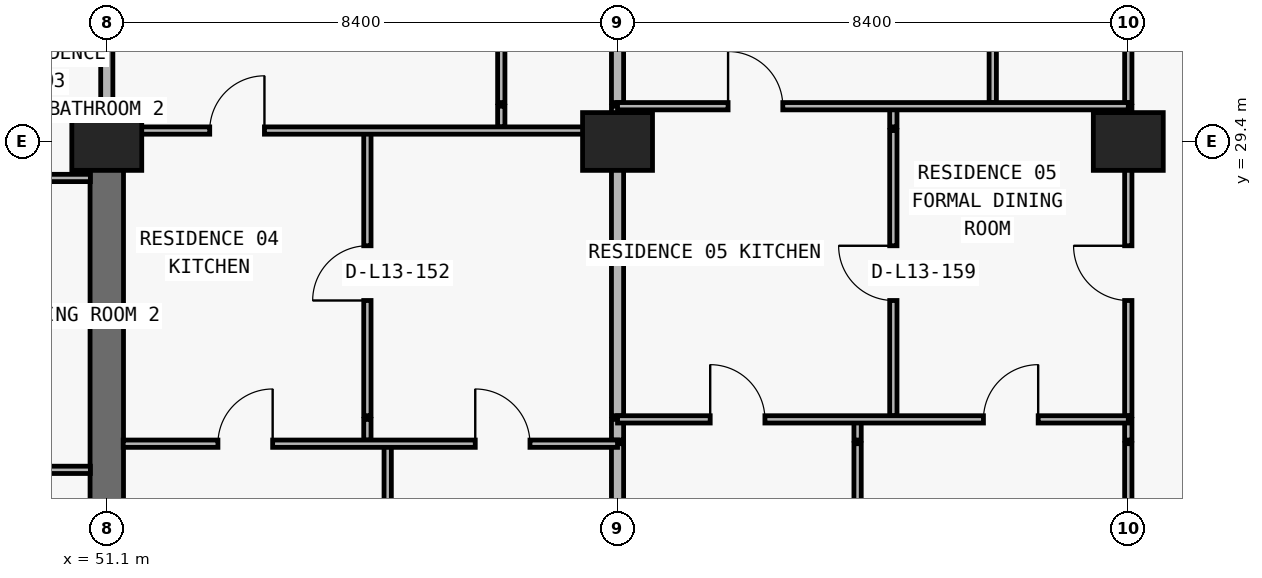
"""IFC4 building model, lengths in metres.
Left out: names, types, materials, properties, quantities, classifications, styles, units other than length and angle.
Written with IfcOpenShell. Run it as: python <this file> out.ifc"""

import sys

from ifc_helpers import new_model, si_unit, direction, frame, frame_2d, origin, origin_2d, place, context, subcontext, project, spatial, rectangle, extrude, element, fill, save


model = new_model("IFC4")
c1 = context("Model", 3, precision=1e-05, world=origin(), true_north=direction((0.0, 1.0)))
c2 = subcontext(c1, "Body", "Model", "MODEL_VIEW")
j1 = project(units=[si_unit("LENGTHUNIT", "METRE"), si_unit("PLANEANGLEUNIT", "RADIAN")], contexts=[c1])
p1 = place(None, origin())
s1 = spatial("IfcSite", under=j1, at=p1, CompositionType="ELEMENT")
p2 = place(p1, origin())
s2 = spatial("IfcBuilding", under=s1, at=p2, CompositionType="ELEMENT")
p3 = place(p2, frame((0.0, 0.0, 53.1)))
s3 = spatial("IfcBuildingStorey", under=s2, at=p3, CompositionType="ELEMENT", Elevation=53.1)
for number, where, z_axis, x_axis in (
    (1, (51.1, 29.4, 0.0), (0.0, 0.0, 1.0), (1.0, 0.0, 0.0)),
    (2, (59.5, 29.4, 0.0), (0.0, 0.0, 1.0), (1.0, 0.0, 0.0)),
    (3, (67.9, 29.4, 0.0), (0.0, 0.0, 1.0), (1.0, 0.0, 0.0)),
):
    element("IfcColumn", number, at=place(p3, frame(where, z_axis=z_axis, x_axis=x_axis)), inside=s3, PredefinedType="COLUMN", context=c2, shape_type="SweptSolid", body=[
        extrude(rectangle(XDim=1.15, YDim=0.95, at=origin_2d()), origin(), (0.0, 0.0, 1.0), 3.05),
    ])
p4 = place(p3, frame((51.1, 20.8, 0.0), z_axis=(0.0, 0.0, 1.0), x_axis=(0.0, 1.0, 0.0)))
e4 = element("IfcWall", 4, at=p4, inside=s3, PredefinedType="SHEAR", context=c2, shape_type="SweptSolid", body=[
    extrude(rectangle(XDim=8.6, YDim=0.55, at=frame_2d((4.3, 0.0))), origin(), (0.0, 0.0, 1.0), 3.05),
])
p5 = place(p3, frame((51.1, 29.64, 0.0), z_axis=(0.0, 0.0, 1.0), x_axis=(0.0, 1.0, 0.0)))
e5 = element("IfcWall", 5, at=p5, inside=s3, PredefinedType="PARTITIONING", context=c2, shape_type="SweptSolid", body=[
    extrude(rectangle(XDim=0.34, YDim=0.2, at=frame_2d((0.17, 0.0))), origin(), (0.0, 0.0, 1.0), 2.335),
])
p6 = place(p3, frame((51.1, 30.04, 0.0), z_axis=(0.0, 0.0, 1.0), x_axis=(0.0, 1.0, 0.0)))
e6 = element("IfcWall", 6, at=p6, inside=s3, PredefinedType="PARTITIONING", context=c2, shape_type="SweptSolid", body=[
    extrude(rectangle(XDim=4.56, YDim=0.2, at=frame_2d((2.28, 0.0))), origin(), (0.0, 0.0, 1.0), 2.335),
])
p7 = place(p3, frame((55.386, 24.49, 0.0), z_axis=(0.0, 0.0, 1.0), x_axis=(0.0, 1.0, 0.0)))
e7 = element("IfcWall", 7, at=p7, inside=s3, PredefinedType="PARTITIONING", context=c2, shape_type="SweptSolid", body=[
    extrude(rectangle(XDim=0.34, YDim=0.12, at=frame_2d((0.17, 0.0))), origin(), (0.0, 0.0, 1.0), 2.423),
])
p8 = place(p3, frame((55.386, 24.89, 0.0), z_axis=(0.0, 0.0, 1.0), x_axis=(0.0, 1.0, 0.0)))
e8 = element("IfcWall", 8, at=p8, inside=s3, PredefinedType="PARTITIONING", context=c2, shape_type="SweptSolid", body=[
    extrude(rectangle(XDim=4.69, YDim=0.12, at=frame_2d((2.345, 0.0))), origin(), (0.0, 0.0, 1.0), 2.423),
])
p9 = place(p8, frame((1.895, 0.0, 0.0)))
e9 = element("IfcOpeningElement", 9, at=p9, cuts=e8, PredefinedType="OPENING", context=c2, shape_type="SweptSolid", body=[
    extrude(rectangle(XDim=0.9, YDim=2.15, at=frame_2d((0.45, 1.075))), frame((0.0, 0.07, 0.0), z_axis=(0.0, -1.0, 0.0), x_axis=(1.0, 0.0, 0.0)), (0.0, 0.0, 1.0), 0.14),
])
p10 = place(p3, frame((55.72, 6.24, 0.0), z_axis=(0.0, 0.0, 1.0), x_axis=(0.0, 1.0, 0.0)))
e10 = element("IfcWall", 10, at=p10, inside=s3, PredefinedType="PARTITIONING", context=c2, shape_type="SweptSolid", body=[
    extrude(rectangle(XDim=18.19, YDim=0.12, at=frame_2d((9.095, 0.0))), origin(), (0.0, 0.0, 1.0), 3.05),
])
p11 = place(p3, frame((57.588, 29.64, 0.0), z_axis=(0.0, 0.0, 1.0), x_axis=(0.0, 1.0, 0.0)))
e11 = element("IfcWall", 11, at=p11, inside=s3, PredefinedType="PARTITIONING", context=c2, shape_type="SweptSolid", body=[
    extrude(rectangle(XDim=0.34, YDim=0.12, at=frame_2d((0.17, 0.0))), origin(), (0.0, 0.0, 1.0), 3.05),
])
p12 = place(p3, frame((57.588, 30.04, 0.0), z_axis=(0.0, 0.0, 1.0), x_axis=(0.0, 1.0, 0.0)))
e12 = element("IfcWall", 12, at=p12, inside=s3, PredefinedType="PARTITIONING", context=c2, shape_type="SweptSolid", body=[
    extrude(rectangle(XDim=4.56, YDim=0.12, at=frame_2d((2.28, 0.0))), origin(), (0.0, 0.0, 1.0), 3.05),
])
p13 = place(p12, frame((1.855, 0.0, 0.0)))
e13 = element("IfcOpeningElement", 13, at=p13, cuts=e12, PredefinedType="OPENING", context=c2, shape_type="SweptSolid", body=[
    extrude(rectangle(XDim=0.85, YDim=2.1, at=frame_2d((0.425, 1.05))), frame((0.0, 0.07, 0.0), z_axis=(0.0, -1.0, 0.0), x_axis=(1.0, 0.0, 0.0)), (0.0, 0.0, 1.0), 0.14),
])
p14 = place(p3, frame((59.5, 6.24, 0.0), z_axis=(0.0, 0.0, 1.0), x_axis=(0.0, 1.0, 0.0)))
e14 = element("IfcWall", 14, at=p14, inside=s3, PredefinedType="PARTITIONING", context=c2, shape_type="SweptSolid", body=[
    extrude(rectangle(XDim=18.19, YDim=0.2, at=frame_2d((9.095, 0.0))), origin(), (0.0, 0.0, 1.0), 2.11),
])
p15 = place(p3, frame((59.5, 24.49, 0.0), z_axis=(0.0, 0.0, 1.0), x_axis=(0.0, 1.0, 0.0)))
e15 = element("IfcWall", 15, at=p15, inside=s3, PredefinedType="PARTITIONING", context=c2, shape_type="SweptSolid", body=[
    extrude(rectangle(XDim=0.34, YDim=0.2, at=frame_2d((0.17, 0.0))), origin(), (0.0, 0.0, 1.0), 2.11),
])
p16 = place(p3, frame((59.5, 24.89, 0.0), z_axis=(0.0, 0.0, 1.0), x_axis=(0.0, 1.0, 0.0)))
e16 = element("IfcWall", 16, at=p16, inside=s3, PredefinedType="PARTITIONING", context=c2, shape_type="SweptSolid", body=[
    extrude(rectangle(XDim=4.69, YDim=0.2, at=frame_2d((2.345, 0.0))), origin(), (0.0, 0.0, 1.0), 2.11),
])
p17 = place(p3, frame((59.5, 29.64, 0.0), z_axis=(0.0, 0.0, 1.0), x_axis=(0.0, 1.0, 0.0)))
e17 = element("IfcWall", 17, at=p17, inside=s3, PredefinedType="PARTITIONING", context=c2, shape_type="SweptSolid", body=[
    extrude(rectangle(XDim=0.34, YDim=0.2, at=frame_2d((0.17, 0.0))), origin(), (0.0, 0.0, 1.0), 2.11),
])
p18 = place(p3, frame((59.5, 30.04, 0.0), z_axis=(0.0, 0.0, 1.0), x_axis=(0.0, 1.0, 0.0)))
e18 = element("IfcWall", 18, at=p18, inside=s3, PredefinedType="PARTITIONING", context=c2, shape_type="SweptSolid", body=[
    extrude(rectangle(XDim=4.56, YDim=0.2, at=frame_2d((2.28, 0.0))), origin(), (0.0, 0.0, 1.0), 2.11),
])
p19 = place(p3, frame((63.448, 6.24, 0.0), z_axis=(0.0, 0.0, 1.0), x_axis=(0.0, 1.0, 0.0)))
e19 = element("IfcWall", 19, at=p19, inside=s3, PredefinedType="PARTITIONING", context=c2, shape_type="SweptSolid", body=[
    extrude(rectangle(XDim=18.19, YDim=0.12, at=frame_2d((9.095, 0.0))), origin(), (0.0, 0.0, 1.0), 2.423),
])
p20 = place(p3, frame((63.448, 24.49, 0.0), z_axis=(0.0, 0.0, 1.0), x_axis=(0.0, 1.0, 0.0)))
e20 = element("IfcWall", 20, at=p20, inside=s3, PredefinedType="PARTITIONING", context=c2, shape_type="SweptSolid", body=[
    extrude(rectangle(XDim=0.34, YDim=0.12, at=frame_2d((0.17, 0.0))), origin(), (0.0, 0.0, 1.0), 2.423),
])
p21 = place(p3, frame((64.036, 24.89, 0.0), z_axis=(0.0, 0.0, 1.0), x_axis=(0.0, 1.0, 0.0)))
e21 = element("IfcWall", 21, at=p21, inside=s3, PredefinedType="PARTITIONING", context=c2, shape_type="SweptSolid", body=[
    extrude(rectangle(XDim=4.69, YDim=0.12, at=frame_2d((2.345, 0.0))), origin(), (0.0, 0.0, 1.0), 3.05),
])
p22 = place(p21, frame((1.895, 0.0, 0.0)))
e22 = element("IfcOpeningElement", 22, at=p22, cuts=e21, PredefinedType="OPENING", context=c2, shape_type="SweptSolid", body=[
    extrude(rectangle(XDim=0.9, YDim=2.15, at=frame_2d((0.45, 1.075))), frame((0.0, 0.07, 0.0), z_axis=(0.0, -1.0, 0.0), x_axis=(1.0, 0.0, 0.0)), (0.0, 0.0, 1.0), 0.14),
])
p23 = place(p3, frame((64.036, 29.64, 0.0), z_axis=(0.0, 0.0, 1.0), x_axis=(0.0, 1.0, 0.0)))
e23 = element("IfcWall", 23, at=p23, inside=s3, PredefinedType="PARTITIONING", context=c2, shape_type="SweptSolid", body=[
    extrude(rectangle(XDim=0.34, YDim=0.12, at=frame_2d((0.17, 0.0))), origin(), (0.0, 0.0, 1.0), 3.05),
])
p24 = place(p3, frame((65.671, 30.04, 0.0), z_axis=(0.0, 0.0, 1.0), x_axis=(0.0, 1.0, 0.0)))
e24 = element("IfcWall", 24, at=p24, inside=s3, PredefinedType="PARTITIONING", context=c2, shape_type="SweptSolid", body=[
    extrude(rectangle(XDim=4.56, YDim=0.12, at=frame_2d((2.28, 0.0))), origin(), (0.0, 0.0, 1.0), 2.578),
])
p25 = place(p24, frame((1.855, 0.0, 0.0)))
e25 = element("IfcOpeningElement", 25, at=p25, cuts=e24, PredefinedType="OPENING", context=c2, shape_type="SweptSolid", body=[
    extrude(rectangle(XDim=0.85, YDim=2.1, at=frame_2d((0.425, 1.05))), frame((0.0, 0.07, 0.0), z_axis=(0.0, -1.0, 0.0), x_axis=(1.0, 0.0, 0.0)), (0.0, 0.0, 1.0), 0.14),
])
p26 = place(p3, frame((67.9, 6.24, 0.0), z_axis=(0.0, 0.0, 1.0), x_axis=(0.0, 1.0, 0.0)))
e26 = element("IfcWall", 26, at=p26, inside=s3, PredefinedType="PARTITIONING", context=c2, shape_type="SweptSolid", body=[
    extrude(rectangle(XDim=18.19, YDim=0.12, at=frame_2d((9.095, 0.0))), origin(), (0.0, 0.0, 1.0), 2.11),
])
p27 = place(p3, frame((67.9, 24.49, 0.0), z_axis=(0.0, 0.0, 1.0), x_axis=(0.0, 1.0, 0.0)))
e27 = element("IfcWall", 27, at=p27, inside=s3, PredefinedType="PARTITIONING", context=c2, shape_type="SweptSolid", body=[
    extrude(rectangle(XDim=0.34, YDim=0.12, at=frame_2d((0.17, 0.0))), origin(), (0.0, 0.0, 1.0), 2.11),
])
p28 = place(p3, frame((67.9, 24.89, 0.0), z_axis=(0.0, 0.0, 1.0), x_axis=(0.0, 1.0, 0.0)))
e28 = element("IfcWall", 28, at=p28, inside=s3, PredefinedType="PARTITIONING", context=c2, shape_type="SweptSolid", body=[
    extrude(rectangle(XDim=4.69, YDim=0.12, at=frame_2d((2.345, 0.0))), origin(), (0.0, 0.0, 1.0), 2.11),
])
p29 = place(p28, frame((1.895, 0.0, 0.0)))
e29 = element("IfcOpeningElement", 29, at=p29, cuts=e28, PredefinedType="OPENING", context=c2, shape_type="SweptSolid", body=[
    extrude(rectangle(XDim=0.9, YDim=2.06, at=frame_2d((0.45, 1.03))), frame((0.0, 0.07, 0.0), z_axis=(0.0, -1.0, 0.0), x_axis=(1.0, 0.0, 0.0)), (0.0, 0.0, 1.0), 0.14),
])
p30 = place(p3, frame((67.9, 29.64, 0.0), z_axis=(0.0, 0.0, 1.0), x_axis=(0.0, 1.0, 0.0)))
e30 = element("IfcWall", 30, at=p30, inside=s3, PredefinedType="PARTITIONING", context=c2, shape_type="SweptSolid", body=[
    extrude(rectangle(XDim=0.34, YDim=0.12, at=frame_2d((0.17, 0.0))), origin(), (0.0, 0.0, 1.0), 2.11),
])
p31 = place(p3, frame((67.9, 30.04, 0.0), z_axis=(0.0, 0.0, 1.0), x_axis=(0.0, 1.0, 0.0)))
e31 = element("IfcWall", 31, at=p31, inside=s3, PredefinedType="PARTITIONING", context=c2, shape_type="SweptSolid", body=[
    extrude(rectangle(XDim=4.56, YDim=0.12, at=frame_2d((2.28, 0.0))), origin(), (0.0, 0.0, 1.0), 2.11),
])
p32 = place(p3, frame((42.7, 24.0, 0.0), z_axis=(0.0, 0.0, 1.0), x_axis=(1.0, 0.0, 0.0)))
e32 = element("IfcWall", 32, at=p32, inside=s3, PredefinedType="PARTITIONING", context=c2, shape_type="SweptSolid", body=[
    extrude(rectangle(XDim=8.13, YDim=0.12, at=frame_2d((4.065, 0.0))), origin(), (0.0, 0.0, 1.0), 3.05),
])
p33 = place(p32, frame((3.615, 0.0, 0.0)))
e33 = element("IfcOpeningElement", 33, at=p33, cuts=e32, PredefinedType="OPENING", context=c2, shape_type="SweptSolid", body=[
    extrude(rectangle(XDim=0.9, YDim=2.15, at=frame_2d((0.45, 1.075))), frame((0.0, 0.07, 0.0), z_axis=(0.0, -1.0, 0.0), x_axis=(1.0, 0.0, 0.0)), (0.0, 0.0, 1.0), 0.14),
])
p34 = place(p3, frame((51.37, 24.43, 0.0), z_axis=(0.0, 0.0, 1.0), x_axis=(1.0, 0.0, 0.0)))
e34 = element("IfcWall", 34, at=p34, inside=s3, PredefinedType="PARTITIONING", context=c2, shape_type="SweptSolid", body=[
    extrude(rectangle(XDim=8.13, YDim=0.12, at=frame_2d((4.065, 0.0))), origin(), (0.0, 0.0, 1.0), 3.05),
])
p35 = place(p34, frame((1.558, 0.0, 0.0)))
e35 = element("IfcOpeningElement", 35, at=p35, cuts=e34, PredefinedType="OPENING", context=c2, shape_type="SweptSolid", body=[
    extrude(rectangle(XDim=0.9, YDim=2.15, at=frame_2d((0.45, 1.075))), frame((0.0, 0.07, 0.0), z_axis=(0.0, -1.0, 0.0), x_axis=(1.0, 0.0, 0.0)), (0.0, 0.0, 1.0), 0.14),
])
p36 = place(p34, frame((5.79, 0.0, 0.0)))
e36 = element("IfcOpeningElement", 36, at=p36, cuts=e34, PredefinedType="OPENING", context=c2, shape_type="SweptSolid", body=[
    extrude(rectangle(XDim=0.9, YDim=2.15, at=frame_2d((0.45, 1.075))), frame((0.0, 0.07, 0.0), z_axis=(0.0, -1.0, 0.0), x_axis=(1.0, 0.0, 0.0)), (0.0, 0.0, 1.0), 0.14),
])
p37 = place(p3, frame((59.5, 24.83, 0.0), z_axis=(0.0, 0.0, 1.0), x_axis=(1.0, 0.0, 0.0)))
e37 = element("IfcWall", 37, at=p37, inside=s3, PredefinedType="PARTITIONING", context=c2, shape_type="SweptSolid", body=[
    extrude(rectangle(XDim=8.4, YDim=0.12, at=frame_2d((4.2, 0.0))), origin(), (0.0, 0.0, 1.0), 3.05),
])
p38 = place(p37, frame((1.524, 0.0, 0.0)))
e38 = element("IfcOpeningElement", 38, at=p38, cuts=e37, PredefinedType="OPENING", context=c2, shape_type="SweptSolid", body=[
    extrude(rectangle(XDim=0.9, YDim=2.15, at=frame_2d((0.45, 1.075))), frame((0.0, 0.07, 0.0), z_axis=(0.0, -1.0, 0.0), x_axis=(1.0, 0.0, 0.0)), (0.0, 0.0, 1.0), 0.14),
])
p39 = place(p37, frame((6.018, 0.0, 0.0)))
e39 = element("IfcOpeningElement", 39, at=p39, cuts=e37, PredefinedType="OPENING", context=c2, shape_type="SweptSolid", body=[
    extrude(rectangle(XDim=0.9, YDim=2.15, at=frame_2d((0.45, 1.075))), frame((0.0, 0.07, 0.0), z_axis=(0.0, -1.0, 0.0), x_axis=(1.0, 0.0, 0.0)), (0.0, 0.0, 1.0), 0.14),
])
p40 = place(p3, frame((42.705, 28.8, 0.0), z_axis=(0.0, 0.0, 1.0), x_axis=(1.0, 0.0, 0.0)))
e40 = element("IfcWall", 40, at=p40, inside=s3, PredefinedType="PARTITIONING", context=c2, shape_type="SweptSolid", body=[
    extrude(rectangle(XDim=8.125, YDim=0.12, at=frame_2d((4.062, 0.0))), origin(), (0.0, 0.0, 1.0), 3.05),
])
p41 = place(p40, frame((2.877, 0.0, 0.0)))
e41 = element("IfcOpeningElement", 41, at=p41, cuts=e40, PredefinedType="OPENING", context=c2, shape_type="SweptSolid", body=[
    extrude(rectangle(XDim=0.9, YDim=2.15, at=frame_2d((0.45, 1.075))), frame((0.0, 0.07, 0.0), z_axis=(0.0, -1.0, 0.0), x_axis=(1.0, 0.0, 0.0)), (0.0, 0.0, 1.0), 0.14),
])
p42 = place(p3, frame((51.1, 29.58, 0.0), z_axis=(0.0, 0.0, 1.0), x_axis=(1.0, 0.0, 0.0)))
e42 = element("IfcWall", 42, at=p42, inside=s3, PredefinedType="PARTITIONING", context=c2, shape_type="SweptSolid", body=[
    extrude(rectangle(XDim=8.4, YDim=0.12, at=frame_2d((4.2, 0.0))), origin(), (0.0, 0.0, 1.0), 2.11),
])
p43 = place(p42, frame((1.693, 0.0, 0.0)))
e43 = element("IfcOpeningElement", 43, at=p43, cuts=e42, PredefinedType="OPENING", context=c2, shape_type="SweptSolid", body=[
    extrude(rectangle(XDim=0.9, YDim=2.06, at=frame_2d((0.45, 1.03))), frame((0.0, 0.07, 0.0), z_axis=(0.0, -1.0, 0.0), x_axis=(1.0, 0.0, 0.0)), (0.0, 0.0, 1.0), 0.14),
])
p44 = place(p3, frame((59.5, 29.98, 0.0), z_axis=(0.0, 0.0, 1.0), x_axis=(1.0, 0.0, 0.0)))
e44 = element("IfcWall", 44, at=p44, inside=s3, PredefinedType="PARTITIONING", context=c2, shape_type="SweptSolid", body=[
    extrude(rectangle(XDim=8.4, YDim=0.12, at=frame_2d((4.2, 0.0))), origin(), (0.0, 0.0, 1.0), 3.05),
])
p45 = place(p44, frame((1.818, 0.0, 0.0)))
e45 = element("IfcOpeningElement", 45, at=p45, cuts=e44, PredefinedType="OPENING", context=c2, shape_type="SweptSolid", body=[
    extrude(rectangle(XDim=0.9, YDim=2.15, at=frame_2d((0.45, 1.075))), frame((0.0, 0.07, 0.0), z_axis=(0.0, -1.0, 0.0), x_axis=(1.0, 0.0, 0.0)), (0.0, 0.0, 1.0), 0.14),
])
p46 = place(p43, origin())
e46 = element("IfcDoor", 46, at=p46, inside=s3, OperationType="SINGLE_SWING_RIGHT", PredefinedType="DOOR", context=c2, shape_type="SweptSolid", body=[
    extrude(rectangle(XDim=0.9, YDim=2.06, at=frame_2d((0.45, 1.03))), frame((0.0, 0.025, 0.0), z_axis=(0.0, -1.0, 0.0), x_axis=(1.0, 0.0, 0.0)), (0.0, 0.0, 1.0), 0.05),
])
fill(e43, e46)
p47 = place(p9, origin())
e47 = element("IfcDoor", 47, at=p47, inside=s3, OperationType="SINGLE_SWING_LEFT", PredefinedType="DOOR", context=c2, shape_type="SweptSolid", body=[
    extrude(rectangle(XDim=0.9, YDim=2.15, at=frame_2d((0.45, 1.075))), frame((0.0, 0.025, 0.0), z_axis=(0.0, -1.0, 0.0), x_axis=(1.0, 0.0, 0.0)), (0.0, 0.0, 1.0), 0.05),
])
fill(e9, e47)
p48 = place(p35, origin())
e48 = element("IfcDoor", 48, at=p48, inside=s3, OperationType="SINGLE_SWING_RIGHT", PredefinedType="DOOR", context=c2, shape_type="SweptSolid", body=[
    extrude(rectangle(XDim=0.9, YDim=2.15, at=frame_2d((0.45, 1.075))), frame((0.0, 0.025, 0.0), z_axis=(0.0, -1.0, 0.0), x_axis=(1.0, 0.0, 0.0)), (0.0, 0.0, 1.0), 0.05),
])
fill(e35, e48)
p49 = place(p36, origin())
e49 = element("IfcDoor", 49, at=p49, inside=s3, OperationType="SINGLE_SWING_LEFT", PredefinedType="DOOR", context=c2, shape_type="SweptSolid", body=[
    extrude(rectangle(XDim=0.9, YDim=2.15, at=frame_2d((0.45, 1.075))), frame((0.0, 0.025, 0.0), z_axis=(0.0, -1.0, 0.0), x_axis=(1.0, 0.0, 0.0)), (0.0, 0.0, 1.0), 0.05),
])
fill(e36, e49)
p50 = place(p45, origin())
e50 = element("IfcDoor", 50, at=p50, inside=s3, OperationType="SINGLE_SWING_LEFT", PredefinedType="DOOR", context=c2, shape_type="SweptSolid", body=[
    extrude(rectangle(XDim=0.9, YDim=2.15, at=frame_2d((0.45, 1.075))), frame((0.0, 0.025, 0.0), z_axis=(0.0, -1.0, 0.0), x_axis=(1.0, 0.0, 0.0)), (0.0, 0.0, 1.0), 0.05),
])
fill(e45, e50)
p51 = place(p22, origin())
e51 = element("IfcDoor", 51, at=p51, inside=s3, OperationType="SINGLE_SWING_RIGHT", PredefinedType="DOOR", context=c2, shape_type="SweptSolid", body=[
    extrude(rectangle(XDim=0.9, YDim=2.15, at=frame_2d((0.45, 1.075))), frame((0.0, 0.025, 0.0), z_axis=(0.0, -1.0, 0.0), x_axis=(1.0, 0.0, 0.0)), (0.0, 0.0, 1.0), 0.05),
])
fill(e22, e51)
p52 = place(p38, origin())
e52 = element("IfcDoor", 52, at=p52, inside=s3, OperationType="SINGLE_SWING_LEFT", PredefinedType="DOOR", context=c2, shape_type="SweptSolid", body=[
    extrude(rectangle(XDim=0.9, YDim=2.15, at=frame_2d((0.45, 1.075))), frame((0.0, 0.025, 0.0), z_axis=(0.0, -1.0, 0.0), x_axis=(1.0, 0.0, 0.0)), (0.0, 0.0, 1.0), 0.05),
])
fill(e38, e52)
p53 = place(p39, origin())
e53 = element("IfcDoor", 53, at=p53, inside=s3, OperationType="SINGLE_SWING_RIGHT", PredefinedType="DOOR", context=c2, shape_type="SweptSolid", body=[
    extrude(rectangle(XDim=0.9, YDim=2.15, at=frame_2d((0.45, 1.075))), frame((0.0, 0.025, 0.0), z_axis=(0.0, -1.0, 0.0), x_axis=(1.0, 0.0, 0.0)), (0.0, 0.0, 1.0), 0.05),
])
fill(e39, e53)
p54 = place(p29, origin())
e54 = element("IfcDoor", 54, at=p54, inside=s3, OperationType="SINGLE_SWING_RIGHT", PredefinedType="DOOR", context=c2, shape_type="SweptSolid", body=[
    extrude(rectangle(XDim=0.9, YDim=2.06, at=frame_2d((0.45, 1.03))), frame((0.0, 0.025, 0.0), z_axis=(0.0, -1.0, 0.0), x_axis=(1.0, 0.0, 0.0)), (0.0, 0.0, 1.0), 0.05),
])
fill(e29, e54)
save(model, sys.argv[1])
